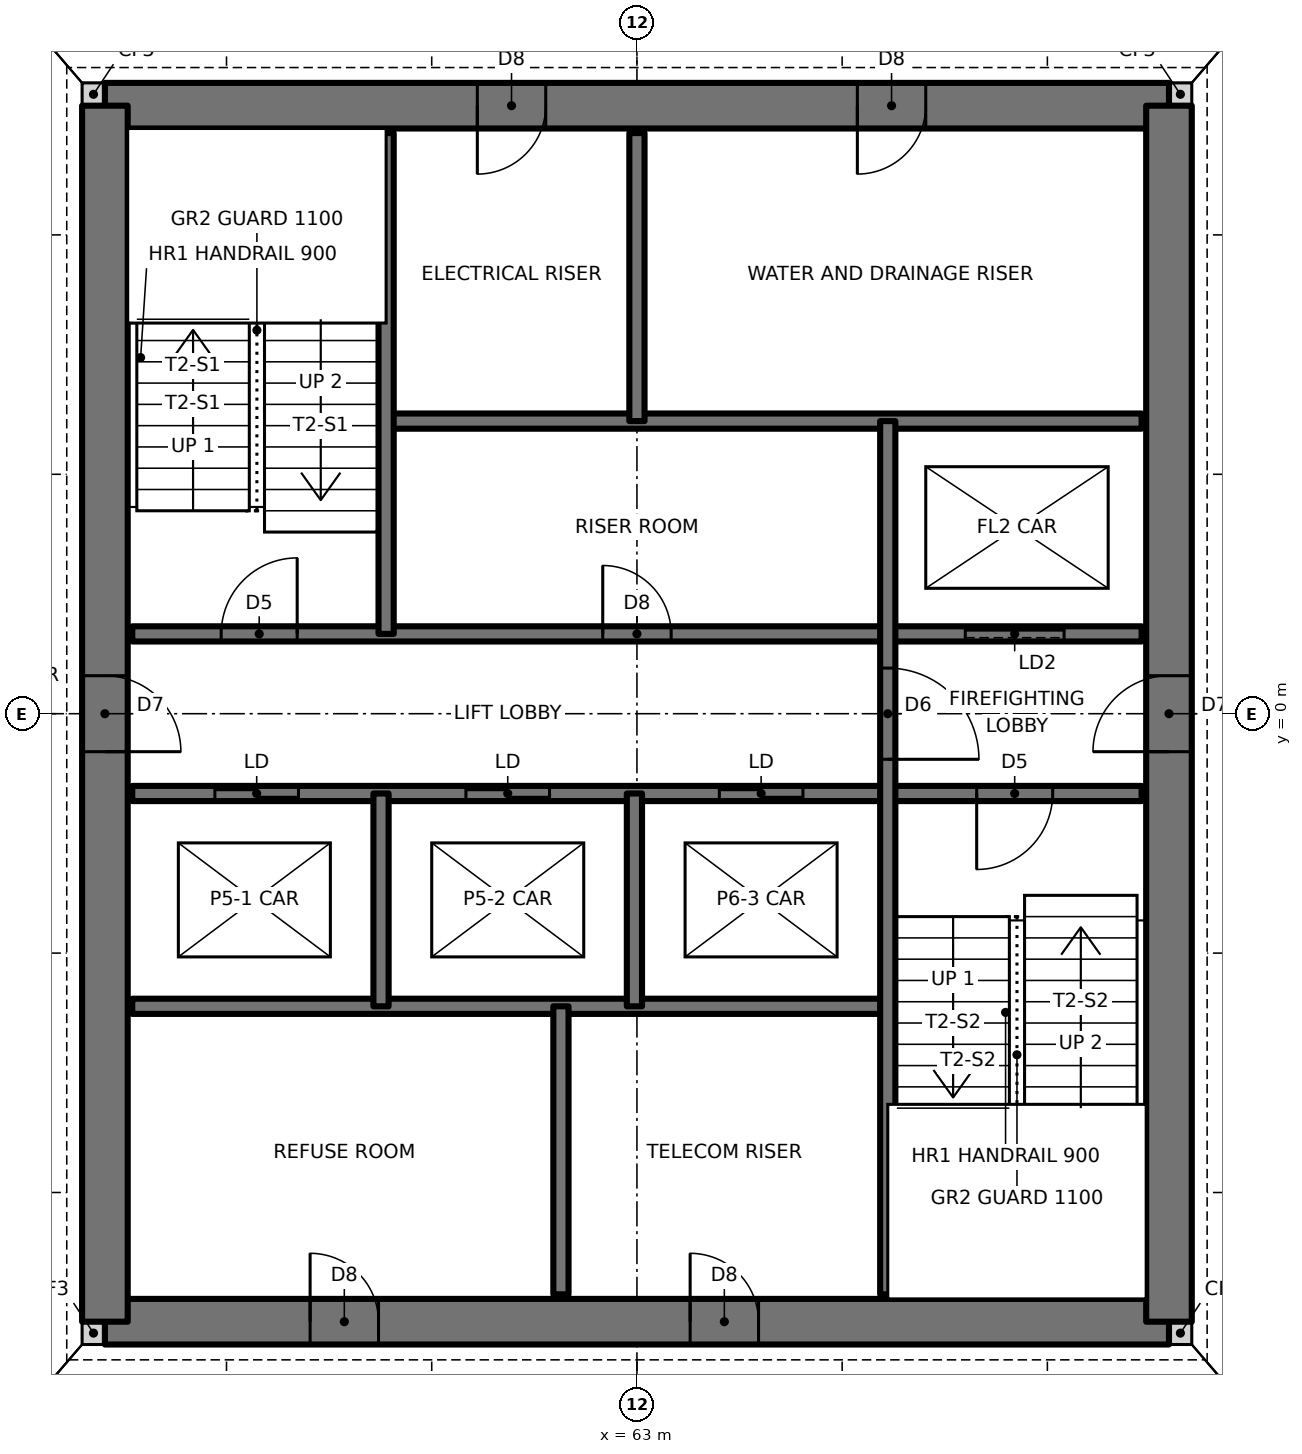
"""IFC4 building model, lengths in metres.
Left out: names, types, materials, properties, quantities, classifications, styles, units other than length and angle.
Written with IfcOpenShell. Run it as: python <this file> out.ifc"""

import sys

from ifc_helpers import new_model, si_unit, direction, frame, frame_2d, origin, place, context, subcontext, project, spatial, rectangle, extrude, element, fill, save


model = new_model("IFC4")
c1 = context("Model", 3, precision=1e-05, world=origin(), true_north=direction((0.0, 1.0)))
c2 = subcontext(c1, "Body", "Model", "MODEL_VIEW")
j1 = project(units=[si_unit("LENGTHUNIT", "METRE"), si_unit("PLANEANGLEUNIT", "RADIAN")], contexts=[c1])
p1 = place(None, origin())
s1 = spatial("IfcSite", under=j1, at=p1, CompositionType="ELEMENT")
p2 = place(p1, origin())
s2 = spatial("IfcBuilding", under=s1, at=p2, CompositionType="ELEMENT")
p3 = place(p2, frame((0.0, 0.0, 25.5)))
s3 = spatial("IfcBuildingStorey", under=s2, at=p3, CompositionType="ELEMENT", Elevation=25.5)
for number, where, z_axis, x_axis in (
    (1, (55.7, -8.15, 0.0), (0.0, 0.0, 1.0), (1.0, 0.0, 0.0)),
    (2, (70.0, -8.15, 0.0), (0.0, 0.0, 1.0), (1.0, 0.0, 0.0)),
    (3, (70.0, 8.15, 0.0), (0.0, 0.0, 1.0), (1.0, 0.0, 0.0)),
    (4, (55.7, 8.15, 0.0), (0.0, 0.0, 1.0), (1.0, 0.0, 0.0)),
):
    element("IfcWall", number, at=place(p3, frame(where, z_axis=z_axis, x_axis=x_axis)), inside=s3, PredefinedType="SOLIDWALL", context=c2, shape_type="SweptSolid", body=[
        extrude(rectangle(XDim=0.3, YDim=0.3, at=frame_2d((0.15, 0.0))), origin(), (0.0, 0.0, 1.0), 3.5),
    ])
p4 = place(p3, frame((56.0, -8.0, 0.0), z_axis=(0.0, 0.0, 1.0), x_axis=(1.0, 0.0, 0.0)))
e5 = element("IfcWall", 5, at=p4, inside=s3, PredefinedType="SHEAR", context=c2, shape_type="SweptSolid", body=[
    extrude(rectangle(XDim=14.0, YDim=0.6, at=frame_2d((7.0, 0.0))), origin(), (0.0, 0.0, 1.0), 3.5),
])
p5 = place(p4, frame((2.7, 0.0, 0.0)))
e6 = element("IfcOpeningElement", 6, at=p5, cuts=e5, PredefinedType="OPENING", context=c2, shape_type="SweptSolid", body=[
    extrude(rectangle(XDim=0.9, YDim=2.1, at=frame_2d((0.45, 1.05))), frame((0.0, 0.31, 0.0), z_axis=(0.0, -1.0, 0.0), x_axis=(1.0, 0.0, 0.0)), (0.0, 0.0, 1.0), 0.62),
])
p6 = place(p4, frame((7.7, 0.0, 0.0)))
e7 = element("IfcOpeningElement", 7, at=p6, cuts=e5, PredefinedType="OPENING", context=c2, shape_type="SweptSolid", body=[
    extrude(rectangle(XDim=0.9, YDim=2.1, at=frame_2d((0.45, 1.05))), frame((0.0, 0.31, 0.0), z_axis=(0.0, -1.0, 0.0), x_axis=(1.0, 0.0, 0.0)), (0.0, 0.0, 1.0), 0.62),
])
p7 = place(p3, frame((70.0, 8.0, 0.0), z_axis=(0.0, 0.0, 1.0), x_axis=(-1.0, 0.0, 0.0)))
e8 = element("IfcWall", 8, at=p7, inside=s3, PredefinedType="SHEAR", context=c2, shape_type="SweptSolid", body=[
    extrude(rectangle(XDim=14.0, YDim=0.6, at=frame_2d((7.0, 0.0))), origin(), (0.0, 0.0, 1.0), 3.5),
])
p8 = place(p7, frame((8.2, 0.0, 0.0)))
e9 = element("IfcOpeningElement", 9, at=p8, cuts=e8, PredefinedType="OPENING", context=c2, shape_type="SweptSolid", body=[
    extrude(rectangle(XDim=0.9, YDim=2.1, at=frame_2d((0.45, 1.05))), frame((0.0, 0.31, 0.0), z_axis=(0.0, -1.0, 0.0), x_axis=(1.0, 0.0, 0.0)), (0.0, 0.0, 1.0), 0.62),
])
p9 = place(p7, frame((3.2, 0.0, 0.0)))
e10 = element("IfcOpeningElement", 10, at=p9, cuts=e8, PredefinedType="OPENING", context=c2, shape_type="SweptSolid", body=[
    extrude(rectangle(XDim=0.9, YDim=2.1, at=frame_2d((0.45, 1.05))), frame((0.0, 0.31, 0.0), z_axis=(0.0, -1.0, 0.0), x_axis=(1.0, 0.0, 0.0)), (0.0, 0.0, 1.0), 0.62),
])
p10 = place(p3, frame((70.0, -8.0, 0.0), z_axis=(0.0, 0.0, 1.0), x_axis=(0.0, 1.0, 0.0)))
e11 = element("IfcWall", 11, at=p10, inside=s3, PredefinedType="SHEAR", context=c2, shape_type="SweptSolid", body=[
    extrude(rectangle(XDim=16.0, YDim=0.6, at=frame_2d((8.0, 0.0))), origin(), (0.0, 0.0, 1.0), 3.5),
])
p11 = place(p10, frame((7.5, 0.0, 0.0)))
e12 = element("IfcOpeningElement", 12, at=p11, cuts=e11, PredefinedType="OPENING", context=c2, shape_type="SweptSolid", body=[
    extrude(rectangle(XDim=1.0, YDim=2.1, at=frame_2d((0.5, 1.05))), frame((0.0, 0.31, 0.0), z_axis=(0.0, -1.0, 0.0), x_axis=(1.0, 0.0, 0.0)), (0.0, 0.0, 1.0), 0.62),
])
p12 = place(p3, frame((56.0, 8.0, 0.0), z_axis=(0.0, 0.0, 1.0), x_axis=(0.0, -1.0, 0.0)))
e13 = element("IfcWall", 13, at=p12, inside=s3, PredefinedType="SHEAR", context=c2, shape_type="SweptSolid", body=[
    extrude(rectangle(XDim=16.0, YDim=0.6, at=frame_2d((8.0, 0.0))), origin(), (0.0, 0.0, 1.0), 3.5),
])
p13 = place(p12, frame((7.5, 0.0, 0.0)))
e14 = element("IfcOpeningElement", 14, at=p13, cuts=e13, PredefinedType="OPENING", context=c2, shape_type="SweptSolid", body=[
    extrude(rectangle(XDim=1.0, YDim=2.1, at=frame_2d((0.5, 1.05))), frame((0.0, 0.31, 0.0), z_axis=(0.0, -1.0, 0.0), x_axis=(1.0, 0.0, 0.0)), (0.0, 0.0, 1.0), 0.62),
])
p14 = place(p3, frame((56.36, -3.85, 0.0), z_axis=(0.0, 0.0, 1.0), x_axis=(1.0, 0.0, 0.0)))
e15 = element("IfcWall", 15, at=p14, inside=s3, PredefinedType="SOLIDWALL", context=c2, shape_type="SweptSolid", body=[
    extrude(rectangle(XDim=9.94, YDim=0.2, at=frame_2d((4.97, 0.0))), origin(), (0.0, 0.0, 1.0), 3.5),
])
p15 = place(p3, frame((56.36, -1.05, 0.0), z_axis=(0.0, 0.0, 1.0), x_axis=(1.0, 0.0, 0.0)))
e16 = element("IfcWall", 16, at=p15, inside=s3, PredefinedType="SOLIDWALL", context=c2, shape_type="SweptSolid", body=[
    extrude(rectangle(XDim=13.28, YDim=0.2, at=frame_2d((6.64, 0.0))), origin(), (0.0, 0.0, 1.0), 3.5),
])
p16 = place(p15, frame((11.11, 0.0, 0.0)))
e17 = element("IfcOpeningElement", 17, at=p16, cuts=e16, PredefinedType="OPENING", context=c2, shape_type="SweptSolid", body=[
    extrude(rectangle(XDim=1.0, YDim=2.1, at=frame_2d((0.5, 1.05))), frame((0.0, 0.11, 0.0), z_axis=(0.0, -1.0, 0.0), x_axis=(1.0, 0.0, 0.0)), (0.0, 0.0, 1.0), 0.22),
])
p17 = place(p15, frame((1.087, 0.0, 0.0)))
e18 = element("IfcOpeningElement", 18, at=p17, cuts=e16, PredefinedType="OPENING", context=c2, shape_type="SweptSolid", body=[
    extrude(rectangle(XDim=1.1, YDim=2.1, at=frame_2d((0.55, 1.05))), frame((0.0, 0.11, 0.0), z_axis=(0.0, -1.0, 0.0), x_axis=(1.0, 0.0, 0.0)), (0.0, 0.0, 1.0), 0.22),
])
p18 = place(p15, frame((4.39, 0.0, 0.0)))
e19 = element("IfcOpeningElement", 19, at=p18, cuts=e16, PredefinedType="OPENING", context=c2, shape_type="SweptSolid", body=[
    extrude(rectangle(XDim=1.1, YDim=2.1, at=frame_2d((0.55, 1.05))), frame((0.0, 0.11, 0.0), z_axis=(0.0, -1.0, 0.0), x_axis=(1.0, 0.0, 0.0)), (0.0, 0.0, 1.0), 0.22),
])
p19 = place(p15, frame((7.724, 0.0, 0.0)))
e20 = element("IfcOpeningElement", 20, at=p19, cuts=e16, PredefinedType="OPENING", context=c2, shape_type="SweptSolid", body=[
    extrude(rectangle(XDim=1.1, YDim=2.1, at=frame_2d((0.55, 1.05))), frame((0.0, 0.11, 0.0), z_axis=(0.0, -1.0, 0.0), x_axis=(1.0, 0.0, 0.0)), (0.0, 0.0, 1.0), 0.22),
])
p20 = place(p3, frame((56.36, 1.05, 0.0), z_axis=(0.0, 0.0, 1.0), x_axis=(1.0, 0.0, 0.0)))
e21 = element("IfcWall", 21, at=p20, inside=s3, PredefinedType="SOLIDWALL", context=c2, shape_type="SweptSolid", body=[
    extrude(rectangle(XDim=13.28, YDim=0.2, at=frame_2d((6.64, 0.0))), origin(), (0.0, 0.0, 1.0), 3.5),
])
p21 = place(p20, frame((1.17, 0.0, 0.0)))
e22 = element("IfcOpeningElement", 22, at=p21, cuts=e21, PredefinedType="OPENING", context=c2, shape_type="SweptSolid", body=[
    extrude(rectangle(XDim=1.0, YDim=2.1, at=frame_2d((0.5, 1.05))), frame((0.0, 0.11, 0.0), z_axis=(0.0, -1.0, 0.0), x_axis=(1.0, 0.0, 0.0)), (0.0, 0.0, 1.0), 0.22),
])
p22 = place(p20, frame((6.19, 0.0, 0.0)))
e23 = element("IfcOpeningElement", 23, at=p22, cuts=e21, PredefinedType="OPENING", context=c2, shape_type="SweptSolid", body=[
    extrude(rectangle(XDim=0.9, YDim=2.1, at=frame_2d((0.45, 1.05))), frame((0.0, 0.11, 0.0), z_axis=(0.0, -1.0, 0.0), x_axis=(1.0, 0.0, 0.0)), (0.0, 0.0, 1.0), 0.22),
])
p23 = place(p20, frame((10.96, 0.0, 0.0)))
e24 = element("IfcOpeningElement", 24, at=p23, cuts=e21, PredefinedType="OPENING", context=c2, shape_type="SweptSolid", body=[
    extrude(rectangle(XDim=1.3, YDim=2.1, at=frame_2d((0.65, 1.05))), frame((0.0, 0.11, 0.0), z_axis=(0.0, -1.0, 0.0), x_axis=(1.0, 0.0, 0.0)), (0.0, 0.0, 1.0), 0.22),
])
p24 = place(p3, frame((59.7, 3.85, 0.0), z_axis=(0.0, 0.0, 1.0), x_axis=(1.0, 0.0, 0.0)))
e25 = element("IfcWall", 25, at=p24, inside=s3, PredefinedType="SOLIDWALL", context=c2, shape_type="SweptSolid", body=[
    extrude(rectangle(XDim=9.94, YDim=0.2, at=frame_2d((4.97, 0.0))), origin(), (0.0, 0.0, 1.0), 3.5),
])
p25 = place(p3, frame((66.3, -7.64, 0.0), z_axis=(0.0, 0.0, 1.0), x_axis=(0.0, 1.0, 0.0)))
e26 = element("IfcWall", 26, at=p25, inside=s3, PredefinedType="SOLIDWALL", context=c2, shape_type="SweptSolid", body=[
    extrude(rectangle(XDim=11.49, YDim=0.2, at=frame_2d((5.745, 0.0))), origin(), (0.0, 0.0, 1.0), 3.5),
])
p26 = place(p25, frame((7.04, 0.0, 0.0)))
e27 = element("IfcOpeningElement", 27, at=p26, cuts=e26, PredefinedType="OPENING", context=c2, shape_type="SweptSolid", body=[
    extrude(rectangle(XDim=1.2, YDim=2.1, at=frame_2d((0.6, 1.05))), frame((0.0, 0.11, 0.0), z_axis=(0.0, -1.0, 0.0), x_axis=(1.0, 0.0, 0.0)), (0.0, 0.0, 1.0), 0.22),
])
p27 = place(p3, frame((63.0, 3.85, 0.0), z_axis=(0.0, 0.0, 1.0), x_axis=(0.0, 1.0, 0.0)))
e28 = element("IfcWall", 28, at=p27, inside=s3, PredefinedType="SOLIDWALL", context=c2, shape_type="SweptSolid", body=[
    extrude(rectangle(XDim=3.79, YDim=0.2, at=frame_2d((1.895, 0.0))), origin(), (0.0, 0.0, 1.0), 3.5),
])
p28 = place(p3, frame((62.967, -3.85, 0.0), z_axis=(0.0, 0.0, 1.0), x_axis=(0.0, 1.0, 0.0)))
e29 = element("IfcWall", 29, at=p28, inside=s3, PredefinedType="SOLIDWALL", context=c2, shape_type="SweptSolid", body=[
    extrude(rectangle(XDim=2.8, YDim=0.2, at=frame_2d((1.4, 0.0))), origin(), (0.0, 0.0, 1.0), 3.5),
])
p29 = place(p3, frame((62.0, -7.64, 0.0), z_axis=(0.0, 0.0, 1.0), x_axis=(0.0, 1.0, 0.0)))
e30 = element("IfcWall", 30, at=p29, inside=s3, PredefinedType="SOLIDWALL", context=c2, shape_type="SweptSolid", body=[
    extrude(rectangle(XDim=3.79, YDim=0.2, at=frame_2d((1.895, 0.0))), origin(), (0.0, 0.0, 1.0), 3.5),
])
p30 = place(p3, frame((59.7, 1.05, 0.0), z_axis=(0.0, 0.0, 1.0), x_axis=(0.0, 1.0, 0.0)))
e31 = element("IfcWall", 31, at=p30, inside=s3, PredefinedType="SOLIDWALL", context=c2, shape_type="SweptSolid", body=[
    extrude(rectangle(XDim=6.59, YDim=0.2, at=frame_2d((3.295, 0.0))), origin(), (0.0, 0.0, 1.0), 3.5),
])
p31 = place(p3, frame((59.633, -3.85, 0.0), z_axis=(0.0, 0.0, 1.0), x_axis=(0.0, 1.0, 0.0)))
e32 = element("IfcWall", 32, at=p31, inside=s3, PredefinedType="SOLIDWALL", context=c2, shape_type="SweptSolid", body=[
    extrude(rectangle(XDim=2.8, YDim=0.2, at=frame_2d((1.4, 0.0))), origin(), (0.0, 0.0, 1.0), 3.5),
])
p32 = place(p21, origin())
e33 = element("IfcDoor", 33, at=p32, inside=s3, OperationType="SINGLE_SWING_RIGHT", PredefinedType="DOOR", context=c2, shape_type="SweptSolid", body=[
    extrude(rectangle(XDim=1.0, YDim=2.1, at=frame_2d((0.5, 1.05))), frame((0.0, 0.025, 0.0), z_axis=(0.0, -1.0, 0.0), x_axis=(1.0, 0.0, 0.0)), (0.0, 0.0, 1.0), 0.05),
])
fill(e22, e33)
p33 = place(p16, frame((1.0, 0.0, 0.0), z_axis=(0.0, 0.0, 1.0), x_axis=(-1.0, 0.0, 0.0)))
e34 = element("IfcDoor", 34, at=p33, inside=s3, OperationType="SINGLE_SWING_RIGHT", PredefinedType="DOOR", context=c2, shape_type="SweptSolid", body=[
    extrude(rectangle(XDim=1.0, YDim=2.1, at=frame_2d((0.5, 1.05))), frame((0.0, 0.025, 0.0), z_axis=(0.0, -1.0, 0.0), x_axis=(1.0, 0.0, 0.0)), (0.0, 0.0, 1.0), 0.05),
])
fill(e17, e34)
p34 = place(p26, frame((1.2, 0.0, 0.0), z_axis=(0.0, 0.0, 1.0), x_axis=(-1.0, 0.0, 0.0)))
e35 = element("IfcDoor", 35, at=p34, inside=s3, OperationType="SINGLE_SWING_RIGHT", PredefinedType="DOOR", context=c2, shape_type="SweptSolid", body=[
    extrude(rectangle(XDim=1.2, YDim=2.1, at=frame_2d((0.6, 1.05))), frame((0.0, 0.025, 0.0), z_axis=(0.0, -1.0, 0.0), x_axis=(1.0, 0.0, 0.0)), (0.0, 0.0, 1.0), 0.05),
])
fill(e27, e35)
p35 = place(p22, origin())
e36 = element("IfcDoor", 36, at=p35, inside=s3, OperationType="SINGLE_SWING_LEFT", PredefinedType="DOOR", context=c2, shape_type="SweptSolid", body=[
    extrude(rectangle(XDim=0.9, YDim=2.1, at=frame_2d((0.45, 1.05))), frame((0.0, 0.025, 0.0), z_axis=(0.0, -1.0, 0.0), x_axis=(1.0, 0.0, 0.0)), (0.0, 0.0, 1.0), 0.05),
])
fill(e23, e36)
p36 = place(p13, origin())
e37 = element("IfcDoor", 37, at=p36, inside=s3, OperationType="SINGLE_SWING_RIGHT", PredefinedType="DOOR", context=c2, shape_type="SweptSolid", body=[
    extrude(rectangle(XDim=1.0, YDim=2.1, at=frame_2d((0.5, 1.05))), frame((0.0, 0.025, 0.0), z_axis=(0.0, -1.0, 0.0), x_axis=(1.0, 0.0, 0.0)), (0.0, 0.0, 1.0), 0.05),
])
fill(e14, e37)
p37 = place(p11, origin())
e38 = element("IfcDoor", 38, at=p37, inside=s3, OperationType="SINGLE_SWING_LEFT", PredefinedType="DOOR", context=c2, shape_type="SweptSolid", body=[
    extrude(rectangle(XDim=1.0, YDim=2.1, at=frame_2d((0.5, 1.05))), frame((0.0, 0.025, 0.0), z_axis=(0.0, -1.0, 0.0), x_axis=(1.0, 0.0, 0.0)), (0.0, 0.0, 1.0), 0.05),
])
fill(e12, e38)
p38 = place(p8, origin())
e39 = element("IfcDoor", 39, at=p38, inside=s3, OperationType="SINGLE_SWING_RIGHT", PredefinedType="DOOR", context=c2, shape_type="SweptSolid", body=[
    extrude(rectangle(XDim=0.9, YDim=2.1, at=frame_2d((0.45, 1.05))), frame((0.0, 0.025, 0.0), z_axis=(0.0, -1.0, 0.0), x_axis=(1.0, 0.0, 0.0)), (0.0, 0.0, 1.0), 0.05),
])
fill(e9, e39)
p39 = place(p9, origin())
e40 = element("IfcDoor", 40, at=p39, inside=s3, OperationType="SINGLE_SWING_RIGHT", PredefinedType="DOOR", context=c2, shape_type="SweptSolid", body=[
    extrude(rectangle(XDim=0.9, YDim=2.1, at=frame_2d((0.45, 1.05))), frame((0.0, 0.025, 0.0), z_axis=(0.0, -1.0, 0.0), x_axis=(1.0, 0.0, 0.0)), (0.0, 0.0, 1.0), 0.05),
])
fill(e10, e40)
p40 = place(p5, origin())
e41 = element("IfcDoor", 41, at=p40, inside=s3, OperationType="SINGLE_SWING_LEFT", PredefinedType="DOOR", context=c2, shape_type="SweptSolid", body=[
    extrude(rectangle(XDim=0.9, YDim=2.1, at=frame_2d((0.45, 1.05))), frame((0.0, 0.025, 0.0), z_axis=(0.0, -1.0, 0.0), x_axis=(1.0, 0.0, 0.0)), (0.0, 0.0, 1.0), 0.05),
])
fill(e6, e41)
p41 = place(p6, origin())
e42 = element("IfcDoor", 42, at=p41, inside=s3, OperationType="SINGLE_SWING_LEFT", PredefinedType="DOOR", context=c2, shape_type="SweptSolid", body=[
    extrude(rectangle(XDim=0.9, YDim=2.1, at=frame_2d((0.45, 1.05))), frame((0.0, 0.025, 0.0), z_axis=(0.0, -1.0, 0.0), x_axis=(1.0, 0.0, 0.0)), (0.0, 0.0, 1.0), 0.05),
])
fill(e7, e42)
p42 = place(p17, origin())
e43 = element("IfcDoor", 43, at=p42, inside=s3, OperationType="DOUBLE_DOOR_SLIDING", PredefinedType="DOOR", context=c2, shape_type="SweptSolid", body=[
    extrude(rectangle(XDim=1.1, YDim=2.1, at=frame_2d((0.55, 1.05))), frame((0.0, 0.025, 0.0), z_axis=(0.0, -1.0, 0.0), x_axis=(1.0, 0.0, 0.0)), (0.0, 0.0, 1.0), 0.05),
])
fill(e18, e43)
p43 = place(p18, origin())
e44 = element("IfcDoor", 44, at=p43, inside=s3, OperationType="DOUBLE_DOOR_SLIDING", PredefinedType="DOOR", context=c2, shape_type="SweptSolid", body=[
    extrude(rectangle(XDim=1.1, YDim=2.1, at=frame_2d((0.55, 1.05))), frame((0.0, 0.025, 0.0), z_axis=(0.0, -1.0, 0.0), x_axis=(1.0, 0.0, 0.0)), (0.0, 0.0, 1.0), 0.05),
])
fill(e19, e44)
p44 = place(p19, origin())
e45 = element("IfcDoor", 45, at=p44, inside=s3, OperationType="DOUBLE_DOOR_SLIDING", PredefinedType="DOOR", context=c2, shape_type="SweptSolid", body=[
    extrude(rectangle(XDim=1.1, YDim=2.1, at=frame_2d((0.55, 1.05))), frame((0.0, 0.025, 0.0), z_axis=(0.0, -1.0, 0.0), x_axis=(1.0, 0.0, 0.0)), (0.0, 0.0, 1.0), 0.05),
])
fill(e20, e45)
p45 = place(p23, origin())
e46 = element("IfcDoor", 46, at=p45, inside=s3, OperationType="SLIDING_TO_LEFT", PredefinedType="DOOR", context=c2, shape_type="SweptSolid", body=[
    extrude(rectangle(XDim=1.3, YDim=2.1, at=frame_2d((0.65, 1.05))), frame((0.0, 0.025, 0.0), z_axis=(0.0, -1.0, 0.0), x_axis=(1.0, 0.0, 0.0)), (0.0, 0.0, 1.0), 0.05),
])
fill(e24, e46)
save(model, sys.argv[1])
